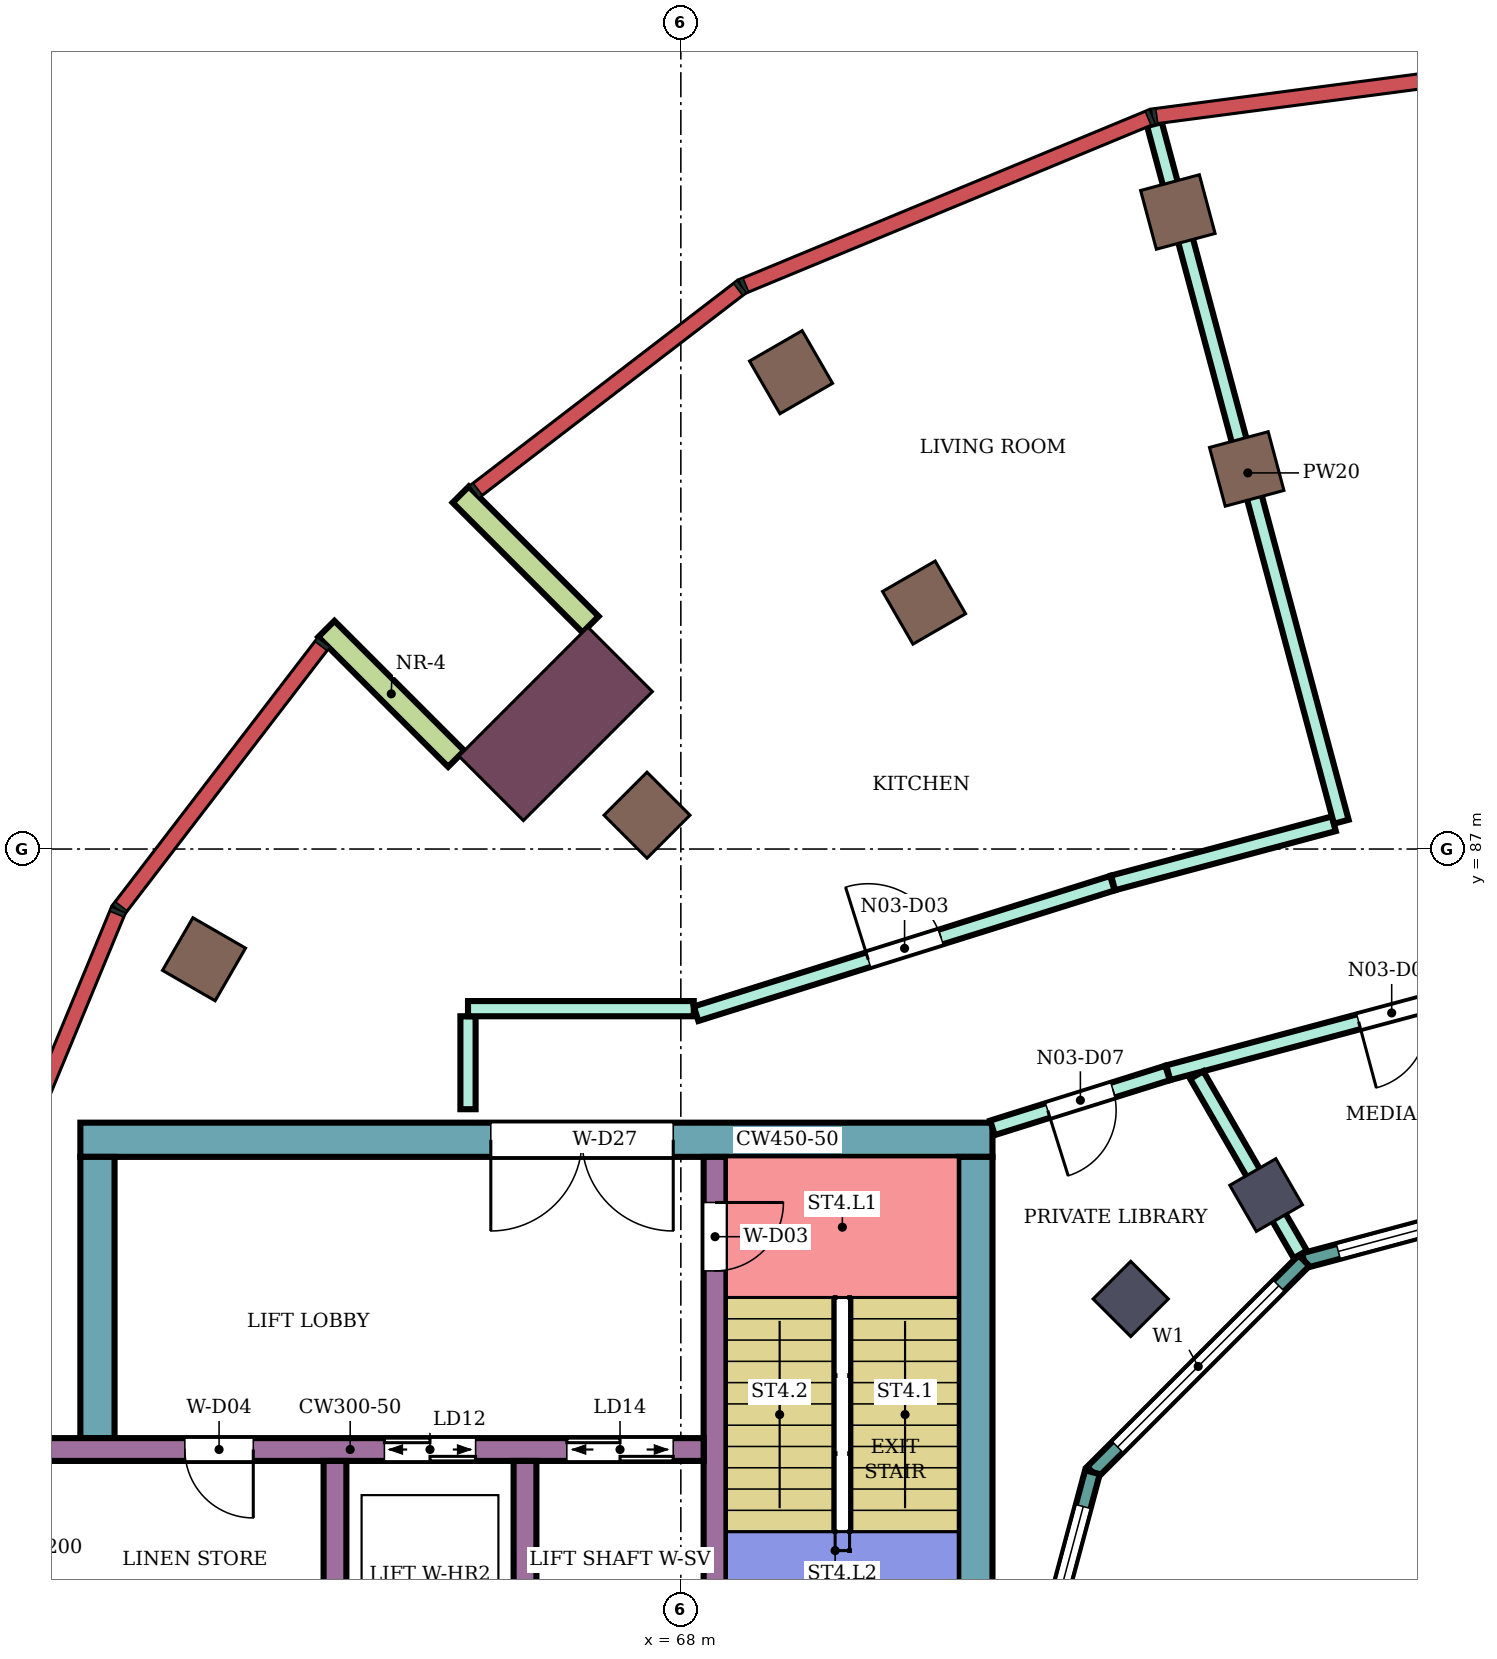
"""IFC4 building model, lengths in metres.
Left out: names, types, materials, properties, quantities, classifications, styles, units other than length and angle.
Written with IfcOpenShell. Run it as: python <this file> out.ifc"""

import sys

from ifc_helpers import new_model, si_unit, direction, frame, frame_2d, origin, origin_2d, place, context, subcontext, project, spatial, rectangle, extrude, element, fill, save


model = new_model("IFC4")
c1 = context("Model", 3, precision=1e-05, world=origin(), true_north=direction((0.0, 1.0)))
c2 = subcontext(c1, "Body", "Model", "MODEL_VIEW")
j1 = project(units=[si_unit("LENGTHUNIT", "METRE"), si_unit("PLANEANGLEUNIT", "RADIAN")], contexts=[c1])
p1 = place(None, origin())
s1 = spatial("IfcSite", under=j1, at=p1, CompositionType="ELEMENT")
p2 = place(p1, origin())
s2 = spatial("IfcBuilding", under=s1, at=p2, CompositionType="ELEMENT")
p3 = place(p2, frame((0.0, 0.0, 300.9)))
s3 = spatial("IfcBuildingStorey", under=s2, at=p3, CompositionType="ELEMENT", Elevation=300.9)
for number, where, z_axis, x_axis in (
    (1, (74.539, 95.381, 0.0), (0.0, 0.0, 1.0), (-0.259, 0.966, 0.0)),
    (2, (69.45, 93.273, 0.0), (0.0, 0.0, 1.0), (-0.5, 0.866, 0.0)),
    (3, (61.727, 85.55, 0.0), (0.0, 0.0, 1.0), (-0.866, 0.5, 0.0)),
    (4, (75.445, 92.0, 0.0), (0.0, 0.0, 1.0), (-0.259, 0.966, 0.0)),
    (5, (71.2, 90.242, 0.0), (0.0, 0.0, 1.0), (-0.5, 0.866, 0.0)),
    (6, (67.555, 87.445, 0.0), (0.0, 0.0, 1.0), (-0.707, 0.707, 0.0)),
):
    element("IfcColumn", number, at=place(p3, frame(where, z_axis=z_axis, x_axis=x_axis)), inside=s3, PredefinedType="COLUMN", context=c2, shape_type="SweptSolid", body=[
        extrude(rectangle(XDim=0.8, YDim=0.8, at=origin_2d()), origin(), (0.0, 0.0, 1.0), 4.2),
    ])
for number, where, z_axis, x_axis in (
    (7, (75.7, 82.448, 0.0), (0.0, 0.0, 1.0), (-0.5, 0.866, 0.0)),
    (8, (73.919, 81.081, 0.0), (0.0, 0.0, 1.0), (-0.707, 0.707, 0.0)),
):
    element("IfcColumn", number, at=place(p3, frame(where, z_axis=z_axis, x_axis=x_axis)), inside=s3, PredefinedType="COLUMN", context=c2, shape_type="SweptSolid", body=[
        extrude(rectangle(XDim=0.7, YDim=0.7, at=origin_2d()), origin(), (0.0, 0.0, 1.0), 4.2),
    ])
p4 = place(p3, frame((66.353, 88.647, 0.0), z_axis=(0.0, 0.0, 1.0), x_axis=(-0.707106781187, 0.707106781187, 0.0)))
e9 = element("IfcColumn", 9, at=p4, inside=s3, PredefinedType="COLUMN", context=c2, shape_type="SweptSolid", body=[
    extrude(rectangle(XDim=1.2, YDim=2.4, at=origin_2d()), origin(), (0.0, 0.0, 1.0), 4.2),
])
p5 = place(p3, frame((72.1, 83.175, 0.0), z_axis=(0.0, 0.0, 1.0), x_axis=(-1.0, 0.0, 0.0)))
e10 = element("IfcWall", 10, at=p5, inside=s3, PredefinedType="SHEAR", context=c2, shape_type="SweptSolid", body=[
    extrude(rectangle(XDim=12.0, YDim=0.45, at=frame_2d((6.0, 0.0))), origin(), (0.0, 0.0, 1.0), 3.88),
])
p6 = place(p5, frame((4.2, 0.0, 0.0)))
e11 = element("IfcOpeningElement", 11, at=p6, cuts=e10, PredefinedType="OPENING", context=c2, shape_type="SweptSolid", body=[
    extrude(rectangle(XDim=2.4, YDim=2.4, at=frame_2d((1.2, 1.2))), frame((0.0, 0.235, 0.0), z_axis=(0.0, -1.0, 0.0), x_axis=(1.0, 0.0, 0.0)), (0.0, 0.0, 1.0), 0.47),
])
p7 = place(p3, frame((71.875, 82.95, 0.0), z_axis=(0.0, 0.0, 1.0), x_axis=(0.0, -1.0, 0.0)))
e12 = element("IfcWall", 12, at=p7, inside=s3, PredefinedType="SHEAR", context=c2, shape_type="SweptSolid", body=[
    extrude(rectangle(XDim=7.95, YDim=0.45, at=frame_2d((3.975, 0.0))), origin(), (0.0, 0.0, 1.0), 3.88),
])
p8 = place(p3, frame((60.325, 82.95, 0.0), z_axis=(0.0, 0.0, 1.0), x_axis=(0.0, -1.0, 0.0)))
e13 = element("IfcWall", 13, at=p8, inside=s3, PredefinedType="SHEAR", context=c2, shape_type="SweptSolid", body=[
    extrude(rectangle(XDim=3.7, YDim=0.45, at=frame_2d((1.85, 0.0))), origin(), (0.0, 0.0, 1.0), 3.88),
])
p9 = place(p3, frame((68.45, 82.95, 0.0), z_axis=(0.0, 0.0, 1.0), x_axis=(0.0, -1.0, 0.0)))
e14 = element("IfcWall", 14, at=p9, inside=s3, PredefinedType="SHEAR", context=c2, shape_type="SweptSolid", body=[
    extrude(rectangle(XDim=7.95, YDim=0.3, at=frame_2d((3.975, 0.0))), origin(), (0.0, 0.0, 1.0), 3.88),
])
p10 = place(p9, frame((0.6, 0.0, 0.0)))
e15 = element("IfcOpeningElement", 15, at=p10, cuts=e14, PredefinedType="OPENING", context=c2, shape_type="SweptSolid", body=[
    extrude(rectangle(XDim=0.9, YDim=2.1, at=frame_2d((0.45, 1.05))), frame((0.0, 0.16, 0.0), z_axis=(0.0, -1.0, 0.0), x_axis=(1.0, 0.0, 0.0)), (0.0, 0.0, 1.0), 0.32),
])
p11 = place(p3, frame((68.3, 79.1, 0.0), z_axis=(0.0, 0.0, 1.0), x_axis=(-1.0, 0.0, 0.0)))
e16 = element("IfcWall", 16, at=p11, inside=s3, PredefinedType="SHEAR", context=c2, shape_type="SweptSolid", body=[
    extrude(rectangle(XDim=9.3, YDim=0.3, at=frame_2d((4.65, 0.0))), origin(), (0.0, 0.0, 1.0), 3.88),
])
p12 = place(p11, frame((0.4, 0.0, 0.0)))
e17 = element("IfcOpeningElement", 17, at=p12, cuts=e16, PredefinedType="OPENING", context=c2, shape_type="SweptSolid", body=[
    extrude(rectangle(XDim=1.4, YDim=2.1, at=frame_2d((0.7, 1.05))), frame((0.0, 0.16, 0.0), z_axis=(0.0, -1.0, 0.0), x_axis=(1.0, 0.0, 0.0)), (0.0, 0.0, 1.0), 0.32),
])
p13 = place(p11, frame((3.0, 0.0, 0.0)))
e18 = element("IfcOpeningElement", 18, at=p13, cuts=e16, PredefinedType="OPENING", context=c2, shape_type="SweptSolid", body=[
    extrude(rectangle(XDim=1.2, YDim=2.1, at=frame_2d((0.6, 1.05))), frame((0.0, 0.16, 0.0), z_axis=(0.0, -1.0, 0.0), x_axis=(1.0, 0.0, 0.0)), (0.0, 0.0, 1.0), 0.32),
])
p14 = place(p11, frame((5.925, 0.0, 0.0)))
e19 = element("IfcOpeningElement", 19, at=p14, cuts=e16, PredefinedType="OPENING", context=c2, shape_type="SweptSolid", body=[
    extrude(rectangle(XDim=0.9, YDim=2.1, at=frame_2d((0.45, 1.05))), frame((0.0, 0.16, 0.0), z_axis=(0.0, -1.0, 0.0), x_axis=(1.0, 0.0, 0.0)), (0.0, 0.0, 1.0), 0.32),
])
for number, where, z_axis, x_axis in (
    (20, (65.95, 78.95, 0.0), (0.0, 0.0, 1.0), (0.0, -1.0, 0.0)),
    (21, (63.45, 78.95, 0.0), (0.0, 0.0, 1.0), (0.0, -1.0, 0.0)),
):
    element("IfcWall", number, at=place(p3, frame(where, z_axis=z_axis, x_axis=x_axis)), inside=s3, PredefinedType="SHEAR", context=c2, shape_type="SweptSolid", body=[
        extrude(rectangle(XDim=2.55, YDim=0.3, at=frame_2d((1.275, 0.0))), origin(), (0.0, 0.0, 1.0), 3.88),
    ])
for number, where, z_axis, x_axis in (
    (22, (66.812, 89.955, 0.0), (0.0, 0.0, 1.0), (-0.707, 0.707, 0.0)),
    (23, (65.045, 88.188, 0.0), (0.0, 0.0, 1.0), (-0.707, 0.707, 0.0)),
):
    element("IfcWall", number, at=place(p3, frame(where, z_axis=z_axis, x_axis=x_axis)), inside=s3, PredefinedType="NOTDEFINED", context=c2, shape_type="SweptSolid", body=[
        extrude(rectangle(XDim=2.416, YDim=0.3, at=frame_2d((1.208, 0.0))), origin(), (0.0, 0.0, 1.0), 4.2),
    ])
p15 = place(p3, frame((80.0, 82.604, 0.0), z_axis=(0.0, 0.0, 1.0), x_axis=(-0.965933654434, -0.258789828301, 0.0)))
e24 = element("IfcWall", 24, at=p15, inside=s3, PredefinedType="NOTDEFINED", context=c2, shape_type="SweptSolid", body=[
    extrude(rectangle(XDim=3.936, YDim=0.2, at=frame_2d((1.968, 0.0))), origin(), (0.0, 0.0, 1.0), 4.2),
])
p16 = place(p15, frame((0.468, 0.0, 0.9)))
e25 = element("IfcOpeningElement", 25, at=p16, cuts=e24, PredefinedType="OPENING", context=c2, shape_type="SweptSolid", body=[
    extrude(rectangle(XDim=3.0, YDim=2.3, at=frame_2d((1.5, 1.15))), frame((0.0, 0.11, 0.0), z_axis=(0.0, -1.0, 0.0), x_axis=(1.0, 0.0, 0.0)), (0.0, 0.0, 1.0), 0.22),
])
p17 = place(p3, frame((76.198, 81.585, 0.0), z_axis=(0.0, 0.0, 1.0), x_axis=(-0.707106781187, -0.707106781187, 0.0)))
e26 = element("IfcWall", 26, at=p17, inside=s3, PredefinedType="NOTDEFINED", context=c2, shape_type="SweptSolid", body=[
    extrude(rectangle(XDim=3.936, YDim=0.2, at=frame_2d((1.968, 0.0))), origin(), (0.0, 0.0, 1.0), 4.2),
])
p18 = place(p17, frame((0.468, 0.0, 0.9)))
e27 = element("IfcOpeningElement", 27, at=p18, cuts=e26, PredefinedType="OPENING", context=c2, shape_type="SweptSolid", body=[
    extrude(rectangle(XDim=3.0, YDim=2.3, at=frame_2d((1.5, 1.15))), frame((0.0, 0.11, 0.0), z_axis=(0.0, -1.0, 0.0), x_axis=(1.0, 0.0, 0.0)), (0.0, 0.0, 1.0), 0.22),
])
p19 = place(p3, frame((73.415, 78.802, 0.0), z_axis=(0.0, 0.0, 1.0), x_axis=(-0.258789828301, -0.965933654434, 0.0)))
e28 = element("IfcWall", 28, at=p19, inside=s3, PredefinedType="NOTDEFINED", context=c2, shape_type="SweptSolid", body=[
    extrude(rectangle(XDim=3.936, YDim=0.2, at=frame_2d((1.968, 0.0))), origin(), (0.0, 0.0, 1.0), 4.2),
])
p20 = place(p19, frame((0.468, 0.0, 0.9)))
e29 = element("IfcOpeningElement", 29, at=p20, cuts=e28, PredefinedType="OPENING", context=c2, shape_type="SweptSolid", body=[
    extrude(rectangle(XDim=3.0, YDim=2.3, at=frame_2d((1.5, 1.15))), frame((0.0, 0.11, 0.0), z_axis=(0.0, -1.0, 0.0), x_axis=(1.0, 0.0, 0.0)), (0.0, 0.0, 1.0), 0.22),
])
p21 = place(p3, frame((65.2, 83.577, 0.0), z_axis=(0.0, 0.0, 1.0), x_axis=(0.0, 1.0, 0.0)))
e30 = element("IfcWall", 30, at=p21, inside=s3, PredefinedType="PARTITIONING", context=c2, shape_type="SweptSolid", body=[
    extrude(rectangle(XDim=1.223, YDim=0.2, at=frame_2d((0.612, 0.0))), origin(), (0.0, 0.0, 1.0), 3.75),
])
p22 = place(p3, frame((65.2, 84.9, 0.0), z_axis=(0.0, 0.0, 1.0), x_axis=(1.0, 0.0, 0.0)))
e31 = element("IfcWall", 31, at=p22, inside=s3, PredefinedType="PARTITIONING", context=c2, shape_type="SweptSolid", body=[
    extrude(rectangle(XDim=2.97, YDim=0.2, at=frame_2d((1.485, 0.0))), origin(), (0.0, 0.0, 1.0), 3.75),
])
p23 = place(p3, frame((68.201, 84.833, 0.0), z_axis=(0.0, 0.0, 1.0), x_axis=(0.95420102455, 0.299166182492, 0.0)))
e32 = element("IfcWall", 32, at=p23, inside=s3, PredefinedType="PARTITIONING", context=c2, shape_type="SweptSolid", body=[
    extrude(rectangle(XDim=5.74, YDim=0.2, at=frame_2d((2.87, 0.0))), origin(), (0.0, 0.0, 1.0), 3.75),
])
p24 = place(p23, frame((2.374, 0.0, 0.0)))
e33 = element("IfcOpeningElement", 33, at=p24, cuts=e32, PredefinedType="OPENING", context=c2, shape_type="SweptSolid", body=[
    extrude(rectangle(XDim=1.0, YDim=2.1, at=frame_2d((0.5, 1.05))), frame((0.0, 0.11, 0.0), z_axis=(0.0, -1.0, 0.0), x_axis=(1.0, 0.0, 0.0)), (0.0, 0.0, 1.0), 0.22),
])
p25 = place(p3, frame((72.1, 83.332, 0.0), z_axis=(0.0, 0.0, 1.0), x_axis=(0.954233106619, 0.299063836383, 0.0)))
e34 = element("IfcWall", 34, at=p25, inside=s3, PredefinedType="PARTITIONING", context=c2, shape_type="SweptSolid", body=[
    extrude(rectangle(XDim=2.414, YDim=0.2, at=frame_2d((1.207, 0.0))), origin(), (0.0, 0.0, 1.0), 3.75),
])
p26 = place(p25, frame((0.762, 0.0, 0.0)))
e35 = element("IfcOpeningElement", 35, at=p26, cuts=e34, PredefinedType="OPENING", context=c2, shape_type="SweptSolid", body=[
    extrude(rectangle(XDim=0.9, YDim=2.1, at=frame_2d((0.45, 1.05))), frame((0.0, 0.11, 0.0), z_axis=(0.0, -1.0, 0.0), x_axis=(1.0, 0.0, 0.0)), (0.0, 0.0, 1.0), 0.22),
])
p27 = place(p3, frame((73.687, 86.555, 0.0), z_axis=(0.0, 0.0, 1.0), x_axis=(0.965987897826, 0.258587279759, 0.0)))
e36 = element("IfcWall", 36, at=p27, inside=s3, PredefinedType="PARTITIONING", context=c2, shape_type="SweptSolid", body=[
    extrude(rectangle(XDim=3.007, YDim=0.2, at=frame_2d((1.503, 0.0))), origin(), (0.0, 0.0, 1.0), 3.75),
])
p28 = place(p3, frame((74.23, 96.538, 0.0), z_axis=(0.0, 0.0, 1.0), x_axis=(0.258775468547, -0.965937501538, 0.0)))
e37 = element("IfcWall", 37, at=p28, inside=s3, PredefinedType="PARTITIONING", context=c2, shape_type="SweptSolid", body=[
    extrude(rectangle(XDim=9.502, YDim=0.2, at=frame_2d((4.751, 0.0))), origin(), (0.0, 0.0, 1.0), 3.75),
])
p29 = place(p3, frame((74.413, 84.057, 0.0), z_axis=(0.0, 0.0, 1.0), x_axis=(0.965972135939, 0.258646153246, 0.0)))
e38 = element("IfcWall", 38, at=p29, inside=s3, PredefinedType="PARTITIONING", context=c2, shape_type="SweptSolid", body=[
    extrude(rectangle(XDim=5.654, YDim=0.2, at=frame_2d((2.827, 0.0))), origin(), (0.0, 0.0, 1.0), 3.75),
])
p30 = place(p29, frame((2.593, 0.0, 0.0)))
e39 = element("IfcOpeningElement", 39, at=p30, cuts=e38, PredefinedType="OPENING", context=c2, shape_type="SweptSolid", body=[
    extrude(rectangle(XDim=0.9, YDim=2.1, at=frame_2d((0.45, 1.05))), frame((0.0, 0.11, 0.0), z_axis=(0.0, -1.0, 0.0), x_axis=(1.0, 0.0, 0.0)), (0.0, 0.0, 1.0), 0.22),
])
p31 = place(p3, frame((74.787, 84.027, 0.0), z_axis=(0.0, 0.0, 1.0), x_axis=(0.500079107518, -0.86597972622, 0.0)))
e40 = element("IfcWall", 40, at=p31, inside=s3, PredefinedType="PARTITIONING", context=c2, shape_type="SweptSolid", body=[
    extrude(rectangle(XDim=2.726, YDim=0.2, at=frame_2d((1.363, 0.0))), origin(), (0.0, 0.0, 1.0), 3.75),
])
p32 = place(p16, origin())
e41 = element("IfcWindow", 41, at=p32, inside=s3, PartitioningType="SINGLE_PANEL", PredefinedType="WINDOW", context=c2, shape_type="SweptSolid", body=[
    extrude(rectangle(XDim=3.0, YDim=2.3, at=frame_2d((1.5, 1.15))), frame((0.0, 0.03, 0.0), z_axis=(0.0, -1.0, 0.0), x_axis=(1.0, 0.0, 0.0)), (0.0, 0.0, 1.0), 0.06),
])
fill(e25, e41)
p33 = place(p18, origin())
e42 = element("IfcWindow", 42, at=p33, inside=s3, PartitioningType="SINGLE_PANEL", PredefinedType="WINDOW", context=c2, shape_type="SweptSolid", body=[
    extrude(rectangle(XDim=3.0, YDim=2.3, at=frame_2d((1.5, 1.15))), frame((0.0, 0.03, 0.0), z_axis=(0.0, -1.0, 0.0), x_axis=(1.0, 0.0, 0.0)), (0.0, 0.0, 1.0), 0.06),
])
fill(e27, e42)
p34 = place(p20, origin())
e43 = element("IfcWindow", 43, at=p34, inside=s3, PartitioningType="SINGLE_PANEL", PredefinedType="WINDOW", context=c2, shape_type="SweptSolid", body=[
    extrude(rectangle(XDim=3.0, YDim=2.3, at=frame_2d((1.5, 1.15))), frame((0.0, 0.03, 0.0), z_axis=(0.0, -1.0, 0.0), x_axis=(1.0, 0.0, 0.0)), (0.0, 0.0, 1.0), 0.06),
])
fill(e29, e43)
p35 = place(p24, origin())
e44 = element("IfcDoor", 44, at=p35, inside=s3, OperationType="SINGLE_SWING_LEFT", PredefinedType="DOOR", context=c2, shape_type="SweptSolid", body=[
    extrude(rectangle(XDim=1.0, YDim=2.1, at=frame_2d((0.5, 1.05))), frame((0.0, 0.025, 0.0), z_axis=(0.0, -1.0, 0.0), x_axis=(1.0, 0.0, 0.0)), (0.0, 0.0, 1.0), 0.05),
])
fill(e33, e44)
p36 = place(p30, frame((0.9, 0.0, 0.0), z_axis=(0.0, 0.0, 1.0), x_axis=(-1.0, 0.0, 0.0)))
e45 = element("IfcDoor", 45, at=p36, inside=s3, OperationType="SINGLE_SWING_RIGHT", PredefinedType="DOOR", context=c2, shape_type="SweptSolid", body=[
    extrude(rectangle(XDim=0.9, YDim=2.1, at=frame_2d((0.45, 1.05))), frame((0.0, 0.025, 0.0), z_axis=(0.0, -1.0, 0.0), x_axis=(1.0, 0.0, 0.0)), (0.0, 0.0, 1.0), 0.05),
])
fill(e39, e45)
p37 = place(p26, frame((0.9, 0.0, 0.0), z_axis=(0.0, 0.0, 1.0), x_axis=(-1.0, 0.0, 0.0)))
e46 = element("IfcDoor", 46, at=p37, inside=s3, OperationType="SINGLE_SWING_RIGHT", PredefinedType="DOOR", context=c2, shape_type="SweptSolid", body=[
    extrude(rectangle(XDim=0.9, YDim=2.1, at=frame_2d((0.45, 1.05))), frame((0.0, 0.025, 0.0), z_axis=(0.0, -1.0, 0.0), x_axis=(1.0, 0.0, 0.0)), (0.0, 0.0, 1.0), 0.05),
])
fill(e35, e46)
p38 = place(p10, origin())
e47 = element("IfcDoor", 47, at=p38, inside=s3, OperationType="SINGLE_SWING_LEFT", PredefinedType="DOOR", context=c2, shape_type="SweptSolid", body=[
    extrude(rectangle(XDim=0.9, YDim=2.1, at=frame_2d((0.45, 1.05))), frame((0.0, 0.025, 0.0), z_axis=(0.0, -1.0, 0.0), x_axis=(1.0, 0.0, 0.0)), (0.0, 0.0, 1.0), 0.05),
])
fill(e15, e47)
p39 = place(p12, origin())
e48 = element("IfcDoor", 48, at=p39, inside=s3, OperationType="DOUBLE_DOOR_SLIDING", PredefinedType="DOOR", context=c2, shape_type="SweptSolid", body=[
    extrude(rectangle(XDim=1.4, YDim=2.1, at=frame_2d((0.7, 1.05))), frame((0.0, 0.025, 0.0), z_axis=(0.0, -1.0, 0.0), x_axis=(1.0, 0.0, 0.0)), (0.0, 0.0, 1.0), 0.05),
])
fill(e17, e48)
p40 = place(p13, origin())
e49 = element("IfcDoor", 49, at=p40, inside=s3, OperationType="DOUBLE_DOOR_SLIDING", PredefinedType="DOOR", context=c2, shape_type="SweptSolid", body=[
    extrude(rectangle(XDim=1.2, YDim=2.1, at=frame_2d((0.6, 1.05))), frame((0.0, 0.025, 0.0), z_axis=(0.0, -1.0, 0.0), x_axis=(1.0, 0.0, 0.0)), (0.0, 0.0, 1.0), 0.05),
])
fill(e18, e49)
p41 = place(p14, origin())
e50 = element("IfcDoor", 50, at=p41, inside=s3, OperationType="SINGLE_SWING_LEFT", PredefinedType="DOOR", context=c2, shape_type="SweptSolid", body=[
    extrude(rectangle(XDim=0.9, YDim=2.1, at=frame_2d((0.45, 1.05))), frame((0.0, 0.025, 0.0), z_axis=(0.0, -1.0, 0.0), x_axis=(1.0, 0.0, 0.0)), (0.0, 0.0, 1.0), 0.05),
])
fill(e19, e50)
p42 = place(p6, origin())
e51 = element("IfcDoor", 51, at=p42, inside=s3, OperationType="DOUBLE_DOOR_SINGLE_SWING", PredefinedType="DOOR", context=c2, shape_type="SweptSolid", body=[
    extrude(rectangle(XDim=2.4, YDim=2.4, at=frame_2d((1.2, 1.2))), frame((0.0, 0.025, 0.0), z_axis=(0.0, -1.0, 0.0), x_axis=(1.0, 0.0, 0.0)), (0.0, 0.0, 1.0), 0.05),
])
fill(e11, e51)
save(model, sys.argv[1])
